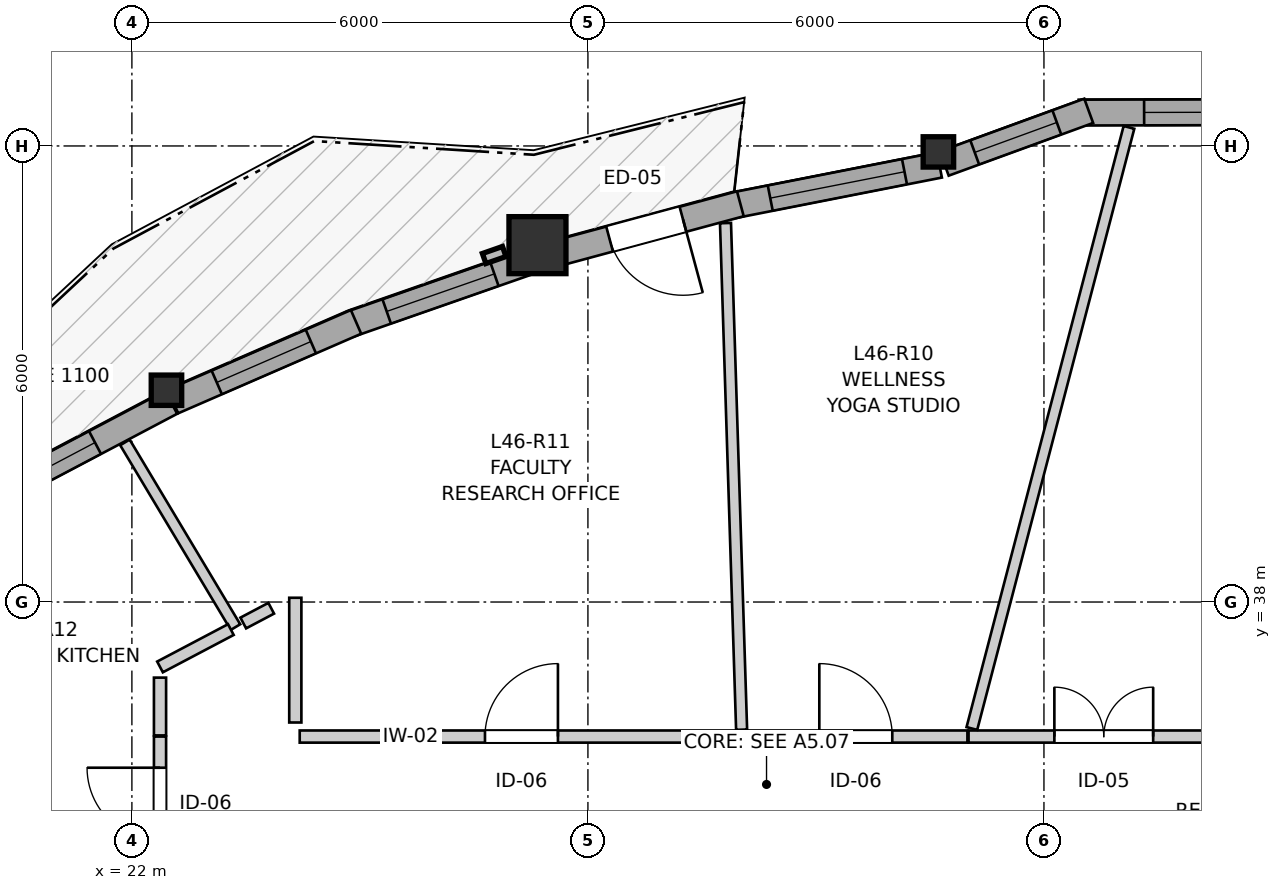
"""IFC4 building model, lengths in metres.
Left out: names, types, materials, properties, quantities, classifications, styles, units other than length and angle.
Written with IfcOpenShell. Run it as: python <this file> out.ifc"""

import sys

from ifc_helpers import new_model, si_unit, direction, frame, frame_2d, origin, origin_2d, place, context, subcontext, project, spatial, rectangle, i_section, extrude, source, transform, mapped, element, fill, save


model = new_model("IFC4")
c1 = context("Model", 3, precision=1e-05, world=origin(), true_north=direction((0.0, 1.0)))
c2 = subcontext(c1, "Body", "Model", "MODEL_VIEW")
j1 = project(units=[si_unit("LENGTHUNIT", "METRE"), si_unit("PLANEANGLEUNIT", "RADIAN")], contexts=[c1])
p1 = place(None, origin())
s1 = spatial("IfcSite", under=j1, at=p1, CompositionType="ELEMENT")
p2 = place(p1, origin())
s2 = spatial("IfcBuilding", under=s1, at=p2, CompositionType="ELEMENT")
p3 = place(p2, frame((0.0, 0.0, 155.4)))
s3 = spatial("IfcBuildingStorey", under=s2, at=p3, CompositionType="ELEMENT", Elevation=155.4)
m1 = source(origin(), c2, "Body", "SweptSolid", [
    extrude(i_section(OverallWidth=0.401, OverallDepth=0.399, WebThickness=0.023, FlangeThickness=0.036, FilletRadius=0.015, at=origin_2d()), origin(), (0.0, 0.0, 1.0), 2.935),
])
p4 = place(p3, frame((32.611, 43.922, 0.0), z_axis=(0.0, 0.0, 1.0), x_axis=(1.0, 0.0, 0.0)))
e1 = element("IfcColumn", 1, at=p4, inside=s3, PredefinedType="PILASTER", context=c2, shape_type="MappedRepresentation", body=[
    mapped(m1, transform((0.0, 0.0, 0.0), x_axis=(1.0, 0.0, 0.0), y_axis=(0.0, 1.0, 0.0), z_axis=(0.0, 0.0, 1.0), scale=1.0)),
])
m2 = source(origin(), c2, "Body", "SweptSolid", [
    extrude(rectangle(XDim=0.75, YDim=0.75, at=origin_2d()), origin(), (0.0, 0.0, 1.0), 2.935),
])
p5 = place(p3, frame((27.336, 42.695, 0.0), z_axis=(0.0, 0.0, 1.0), x_axis=(1.0, 0.0, 0.0)))
e2 = element("IfcColumn", 2, at=p5, inside=s3, PredefinedType="COLUMN", context=c2, shape_type="MappedRepresentation", body=[
    mapped(m2, transform((0.0, 0.0, 0.0), x_axis=(1.0, 0.0, 0.0), y_axis=(0.0, 1.0, 0.0), z_axis=(0.0, 0.0, 1.0), scale=1.0)),
])
p6 = place(p3, frame((22.455, 40.786, 0.0), z_axis=(0.0, 0.0, 1.0), x_axis=(1.0, 0.0, 0.0)))
e3 = element("IfcColumn", 3, at=p6, inside=s3, PredefinedType="PILASTER", context=c2, shape_type="MappedRepresentation", body=[
    mapped(m1, transform((0.0, 0.0, 0.0), x_axis=(1.0, 0.0, 0.0), y_axis=(0.0, 1.0, 0.0), z_axis=(0.0, 0.0, 1.0), scale=1.0)),
])
p7 = place(p3, frame((36.538, 44.444, 0.0), z_axis=(0.0, 0.0, 1.0), x_axis=(-0.999997247411, -0.002346309825, 0.0)))
e4 = element("IfcWall", 4, at=p7, inside=s3, PredefinedType="SOLIDWALL", context=c2, shape_type="SweptSolid", body=[
    extrude(rectangle(XDim=2.081, YDim=0.34, at=frame_2d((1.041, 0.0))), origin(), (0.0, 0.0, 1.0), 2.515),
])
p8 = place(p7, frame((0.271, 0.0, 0.82)))
e5 = element("IfcOpeningElement", 5, at=p8, cuts=e4, PredefinedType="OPENING", context=c2, shape_type="SweptSolid", body=[
    extrude(rectangle(XDim=0.95, YDim=1.35, at=frame_2d((0.475, 0.675))), frame((0.0, 0.18, 0.0), z_axis=(0.0, -1.0, 0.0), x_axis=(1.0, 0.0, 0.0)), (0.0, 0.0, 1.0), 0.36),
])
p9 = place(p3, frame((34.589, 44.462, 0.0), z_axis=(0.0, 0.0, 1.0), x_axis=(-0.939387553708, -0.342857148007, 0.0)))
e6 = element("IfcWall", 6, at=p9, inside=s3, PredefinedType="SOLIDWALL", context=c2, shape_type="SweptSolid", body=[
    extrude(rectangle(XDim=2.023, YDim=0.34, at=frame_2d((1.011, 0.0))), origin(), (0.0, 0.0, 1.0), 2.515),
])
p10 = place(p9, frame((0.447, 0.0, 0.82)))
e7 = element("IfcOpeningElement", 7, at=p10, cuts=e6, PredefinedType="OPENING", context=c2, shape_type="SweptSolid", body=[
    extrude(rectangle(XDim=1.15, YDim=1.2, at=frame_2d((0.575, 0.6))), frame((0.0, 0.18, 0.0), z_axis=(0.0, -1.0, 0.0), x_axis=(1.0, 0.0, 0.0)), (0.0, 0.0, 1.0), 0.36),
])
p11 = place(p3, frame((32.625, 43.751, 0.0), z_axis=(0.0, 0.0, 1.0), x_axis=(-0.981232663103, -0.192827541756, 0.0)))
e8 = element("IfcWall", 8, at=p11, inside=s3, PredefinedType="SOLIDWALL", context=c2, shape_type="SweptSolid", body=[
    extrude(rectangle(XDim=2.756, YDim=0.34, at=frame_2d((1.378, 0.0))), origin(), (0.0, 0.0, 1.0), 2.515),
])
p12 = place(p11, frame((0.468, 0.0, 0.82)))
e9 = element("IfcOpeningElement", 9, at=p12, cuts=e8, PredefinedType="OPENING", context=c2, shape_type="SweptSolid", body=[
    extrude(rectangle(XDim=1.8, YDim=1.45, at=frame_2d((0.9, 0.725))), frame((0.0, 0.18, 0.0), z_axis=(0.0, -1.0, 0.0), x_axis=(1.0, 0.0, 0.0)), (0.0, 0.0, 1.0), 0.36),
])
p13 = place(p3, frame((30.006, 43.24, 0.0), z_axis=(0.0, 0.0, 1.0), x_axis=(-0.965448248334, -0.260594857563, 0.0)))
e10 = element("IfcWall", 10, at=p13, inside=s3, PredefinedType="SOLIDWALL", context=c2, shape_type="SweptSolid", body=[
    extrude(rectangle(XDim=2.564, YDim=0.34, at=frame_2d((1.282, 0.0))), origin(), (0.0, 0.0, 1.0), 2.515),
])
p14 = place(p13, frame((0.782, 0.0, 0.0)))
e11 = element("IfcOpeningElement", 11, at=p14, cuts=e10, PredefinedType="OPENING", context=c2, shape_type="SweptSolid", body=[
    extrude(rectangle(XDim=1.0, YDim=2.1, at=frame_2d((0.5, 1.05))), frame((0.0, 0.18, 0.0), z_axis=(0.0, -1.0, 0.0), x_axis=(1.0, 0.0, 0.0)), (0.0, 0.0, 1.0), 0.36),
])
p15 = place(p3, frame((27.246, 42.483, 0.0), z_axis=(0.0, 0.0, 1.0), x_axis=(-0.944132901201, -0.32956496305, 0.0)))
e12 = element("IfcWall", 12, at=p15, inside=s3, PredefinedType="SOLIDWALL", context=c2, shape_type="SweptSolid", body=[
    extrude(rectangle(XDim=2.52, YDim=0.34, at=frame_2d((1.26, 0.0))), origin(), (0.0, 0.0, 1.0), 2.515),
])
p16 = place(p15, frame((0.505, 0.0, 0.82)))
e13 = element("IfcOpeningElement", 13, at=p16, cuts=e12, PredefinedType="OPENING", context=c2, shape_type="SweptSolid", body=[
    extrude(rectangle(XDim=1.5, YDim=1.45, at=frame_2d((0.75, 0.725))), frame((0.0, 0.18, 0.0), z_axis=(0.0, -1.0, 0.0), x_axis=(1.0, 0.0, 0.0)), (0.0, 0.0, 1.0), 0.36),
])
p17 = place(p3, frame((24.949, 41.685, 0.0), z_axis=(0.0, 0.0, 1.0), x_axis=(-0.917112921707, -0.398627506373, 0.0)))
e14 = element("IfcWall", 14, at=p17, inside=s3, PredefinedType="SOLIDWALL", context=c2, shape_type="SweptSolid", body=[
    extrude(rectangle(XDim=2.625, YDim=0.34, at=frame_2d((1.313, 0.0))), origin(), (0.0, 0.0, 1.0), 2.515),
])
p18 = place(p17, frame((0.648, 0.0, 0.82)))
e15 = element("IfcOpeningElement", 15, at=p18, cuts=e14, PredefinedType="OPENING", context=c2, shape_type="SweptSolid", body=[
    extrude(rectangle(XDim=1.35, YDim=1.45, at=frame_2d((0.675, 0.725))), frame((0.0, 0.18, 0.0), z_axis=(0.0, -1.0, 0.0), x_axis=(1.0, 0.0, 0.0)), (0.0, 0.0, 1.0), 0.36),
])
p19 = place(p3, frame((22.517, 40.627, 0.0), z_axis=(0.0, 0.0, 1.0), x_axis=(-0.884374030812, -0.466778934427, 0.0)))
e16 = element("IfcWall", 16, at=p19, inside=s3, PredefinedType="SOLIDWALL", context=c2, shape_type="SweptSolid", body=[
    extrude(rectangle(XDim=2.611, YDim=0.34, at=frame_2d((1.306, 0.0))), origin(), (0.0, 0.0, 1.0), 2.515),
])
p20 = place(p19, frame((1.133, 0.0, 0.82)))
e17 = element("IfcOpeningElement", 17, at=p20, cuts=e16, PredefinedType="OPENING", context=c2, shape_type="SweptSolid", body=[
    extrude(rectangle(XDim=1.05, YDim=1.45, at=frame_2d((0.525, 0.725))), frame((0.0, 0.18, 0.0), z_axis=(0.0, -1.0, 0.0), x_axis=(1.0, 0.0, 0.0)), (0.0, 0.0, 1.0), 0.36),
])
p21 = place(p3, frame((24.208, 36.23, 0.0), z_axis=(0.0, 0.0, 1.0), x_axis=(1.0, 0.0, 0.0)))
e18 = element("IfcWall", 18, at=p21, inside=s3, PredefinedType="PARTITIONING", context=c2, shape_type="SweptSolid", body=[
    extrude(rectangle(XDim=5.832, YDim=0.16, at=frame_2d((2.916, 0.0))), origin(), (0.0, 0.0, 1.0), 2.935),
])
p22 = place(p21, frame((2.438, 0.0, 0.0)))
e19 = element("IfcOpeningElement", 19, at=p22, cuts=e18, PredefinedType="OPENING", context=c2, shape_type="SweptSolid", body=[
    extrude(rectangle(XDim=0.96, YDim=2.1, at=frame_2d((0.48, 1.05))), frame((0.0, 0.09, 0.0), z_axis=(0.0, -1.0, 0.0), x_axis=(1.0, 0.0, 0.0)), (0.0, 0.0, 1.0), 0.18),
])
p23 = place(p3, frame((33.008, 36.23, 0.0), z_axis=(0.0, 0.0, 1.0), x_axis=(1.0, 0.0, 0.0)))
e20 = element("IfcWall", 20, at=p23, inside=s3, PredefinedType="PARTITIONING", context=c2, shape_type="SweptSolid", body=[
    extrude(rectangle(XDim=3.542, YDim=0.16, at=frame_2d((1.771, 0.0))), origin(), (0.0, 0.0, 1.0), 2.573),
])
p24 = place(p23, frame((1.129, 0.0, 0.0)))
e21 = element("IfcOpeningElement", 21, at=p24, cuts=e20, PredefinedType="OPENING", context=c2, shape_type="SweptSolid", body=[
    extrude(rectangle(XDim=1.3, YDim=2.1, at=frame_2d((0.65, 1.05))), frame((0.0, 0.09, 0.0), z_axis=(0.0, -1.0, 0.0), x_axis=(1.0, 0.0, 0.0)), (0.0, 0.0, 1.0), 0.18),
])
p25 = place(p3, frame((30.055, 36.23, 0.0), z_axis=(0.0, 0.0, 1.0), x_axis=(1.0, 0.0, 0.0)))
e22 = element("IfcWall", 22, at=p25, inside=s3, PredefinedType="PARTITIONING", context=c2, shape_type="SweptSolid", body=[
    extrude(rectangle(XDim=2.938, YDim=0.16, at=frame_2d((1.469, 0.0))), origin(), (0.0, 0.0, 1.0), 2.573),
])
p26 = place(p25, frame((0.99, 0.0, 0.0)))
e23 = element("IfcOpeningElement", 23, at=p26, cuts=e22, PredefinedType="OPENING", context=c2, shape_type="SweptSolid", body=[
    extrude(rectangle(XDim=0.96, YDim=2.1, at=frame_2d((0.48, 1.05))), frame((0.0, 0.09, 0.0), z_axis=(0.0, -1.0, 0.0), x_axis=(1.0, 0.0, 0.0)), (0.0, 0.0, 1.0), 0.18),
])
p27 = place(p3, frame((22.37, 34.45, 0.0), z_axis=(0.0, 0.0, 1.0), x_axis=(0.0, 1.0, 0.0)))
e24 = element("IfcWall", 24, at=p27, inside=s3, PredefinedType="PARTITIONING", context=c2, shape_type="SweptSolid", body=[
    extrude(rectangle(XDim=1.78, YDim=0.16, at=frame_2d((0.89, 0.0))), origin(), (0.0, 0.0, 1.0), 2.935),
])
p28 = place(p27, frame((0.41, 0.0, 0.0)))
e25 = element("IfcOpeningElement", 25, at=p28, cuts=e24, PredefinedType="OPENING", context=c2, shape_type="SweptSolid", body=[
    extrude(rectangle(XDim=0.96, YDim=2.1, at=frame_2d((0.48, 1.05))), frame((0.0, 0.09, 0.0), z_axis=(0.0, -1.0, 0.0), x_axis=(1.0, 0.0, 0.0)), (0.0, 0.0, 1.0), 0.18),
])
p29 = place(p3, frame((33.052, 36.336, 0.0), z_axis=(0.0, 0.0, 1.0), x_axis=(0.252838925964, 0.967508386277, 0.0)))
e26 = element("IfcWall", 26, at=p29, inside=s3, PredefinedType="PARTITIONING", context=c2, shape_type="SweptSolid", body=[
    extrude(rectangle(XDim=8.174, YDim=0.145, at=frame_2d((4.087, 0.0))), origin(), (0.0, 0.0, 1.0), 2.935),
])
p30 = place(p3, frame((29.81, 42.985, 0.0), z_axis=(0.0, 0.0, 1.0), x_axis=(0.031815387529, -0.99949376242, 0.0)))
e27 = element("IfcWall", 27, at=p30, inside=s3, PredefinedType="PARTITIONING", context=c2, shape_type="SweptSolid", body=[
    extrude(rectangle(XDim=6.668, YDim=0.145, at=frame_2d((3.334, 0.0))), origin(), (0.0, 0.0, 1.0), 2.935),
])
p31 = place(p3, frame((17.545, 37.432, 0.0), z_axis=(0.0, 0.0, 1.0), x_axis=(0.745965905636, -0.665984134668, 0.0)))
e28 = element("IfcWall", 28, at=p31, inside=s3, PredefinedType="PARTITIONING", context=c2, shape_type="SweptSolid", body=[
    extrude(rectangle(XDim=6.288, YDim=0.145, at=frame_2d((3.144, 0.0))), origin(), (0.0, 0.0, 1.0), 2.935),
])
p32 = place(p3, frame((21.908, 40.1, 0.0), z_axis=(0.0, 0.0, 1.0), x_axis=(0.513582752497, -0.85804006686, 0.0)))
e29 = element("IfcWall", 29, at=p32, inside=s3, PredefinedType="PARTITIONING", context=c2, shape_type="SweptSolid", body=[
    extrude(rectangle(XDim=2.832, YDim=0.145, at=frame_2d((1.416, 0.0))), origin(), (0.0, 0.0, 1.0), 2.935),
])
p33 = place(p3, frame((24.15, 36.415, 0.0), z_axis=(0.0, 0.0, 1.0), x_axis=(0.0, 1.0, 0.0)))
e30 = element("IfcWall", 30, at=p33, inside=s3, PredefinedType="PARTITIONING", context=c2, shape_type="SweptSolid", body=[
    extrude(rectangle(XDim=1.641, YDim=0.16, at=frame_2d((0.82, 0.0))), origin(), (0.0, 0.0, 1.0), 2.935),
])
p34 = place(p3, frame((22.37, 37.146, 0.0), z_axis=(0.0, 0.0, 1.0), x_axis=(0.884530854714, 0.46648168995, 0.0)))
e31 = element("IfcWall", 31, at=p34, inside=s3, PredefinedType="PARTITIONING", context=c2, shape_type="SweptSolid", body=[
    extrude(rectangle(XDim=1.053, YDim=0.16, at=frame_2d((0.527, 0.0))), origin(), (0.0, 0.0, 1.0), 2.543),
])
p35 = place(p3, frame((22.37, 36.245, 0.0), z_axis=(0.0, 0.0, 1.0), x_axis=(0.0, 1.0, 0.0)))
e32 = element("IfcWall", 32, at=p35, inside=s3, PredefinedType="PARTITIONING", context=c2, shape_type="SweptSolid", body=[
    extrude(rectangle(XDim=0.76, YDim=0.16, at=frame_2d((0.38, 0.0))), origin(), (0.0, 0.0, 1.0), 2.935),
])
p36 = place(p3, frame((23.465, 37.724, 0.0), z_axis=(0.0, 0.0, 1.0), x_axis=(0.884344349775, 0.466835164722, 0.0)))
e33 = element("IfcWall", 33, at=p36, inside=s3, PredefinedType="PARTITIONING", context=c2, shape_type="SweptSolid", body=[
    extrude(rectangle(XDim=0.416, YDim=0.16, at=frame_2d((0.208, 0.0))), origin(), (0.0, 0.0, 1.0), 2.543),
])
m3 = source(origin(), c2, "Body", "SweptSolid", [
    extrude(rectangle(XDim=0.95, YDim=1.35, at=frame_2d((0.475, 0.675))), frame((0.0, 0.03, 0.0), z_axis=(0.0, -1.0, 0.0), x_axis=(1.0, 0.0, 0.0)), (0.0, 0.0, 1.0), 0.06),
])
p37 = place(p8, origin())
e34 = element("IfcWindow", 34, at=p37, inside=s3, PartitioningType="SINGLE_PANEL", PredefinedType="WINDOW", context=c2, shape_type="MappedRepresentation", body=[
    mapped(m3, transform((0.0, 0.0, 0.0), x_axis=(1.0, 0.0, 0.0), y_axis=(0.0, 1.0, 0.0), z_axis=(0.0, 0.0, 1.0), scale=1.0)),
])
fill(e5, e34)
m4 = source(origin(), c2, "Body", "SweptSolid", [
    extrude(rectangle(XDim=1.15, YDim=1.2, at=frame_2d((0.575, 0.6))), frame((0.0, 0.03, 0.0), z_axis=(0.0, -1.0, 0.0), x_axis=(1.0, 0.0, 0.0)), (0.0, 0.0, 1.0), 0.06),
])
p38 = place(p10, origin())
e35 = element("IfcWindow", 35, at=p38, inside=s3, PartitioningType="SINGLE_PANEL", PredefinedType="WINDOW", context=c2, shape_type="MappedRepresentation", body=[
    mapped(m4, transform((0.0, 0.0, 0.0), x_axis=(1.0, 0.0, 0.0), y_axis=(0.0, 1.0, 0.0), z_axis=(0.0, 0.0, 1.0), scale=1.0)),
])
fill(e7, e35)
m5 = source(origin(), c2, "Body", "SweptSolid", [
    extrude(rectangle(XDim=1.8, YDim=1.45, at=frame_2d((0.9, 0.725))), frame((0.0, 0.03, 0.0), z_axis=(0.0, -1.0, 0.0), x_axis=(1.0, 0.0, 0.0)), (0.0, 0.0, 1.0), 0.06),
])
p39 = place(p12, origin())
e36 = element("IfcWindow", 36, at=p39, inside=s3, PartitioningType="SINGLE_PANEL", PredefinedType="WINDOW", context=c2, shape_type="MappedRepresentation", body=[
    mapped(m5, transform((0.0, 0.0, 0.0), x_axis=(1.0, 0.0, 0.0), y_axis=(0.0, 1.0, 0.0), z_axis=(0.0, 0.0, 1.0), scale=1.0)),
])
fill(e9, e36)
m6 = source(origin(), c2, "Body", "SweptSolid", [
    extrude(rectangle(XDim=1.5, YDim=1.45, at=frame_2d((0.75, 0.725))), frame((0.0, 0.03, 0.0), z_axis=(0.0, -1.0, 0.0), x_axis=(1.0, 0.0, 0.0)), (0.0, 0.0, 1.0), 0.06),
])
p40 = place(p16, origin())
e37 = element("IfcWindow", 37, at=p40, inside=s3, PartitioningType="SINGLE_PANEL", PredefinedType="WINDOW", context=c2, shape_type="MappedRepresentation", body=[
    mapped(m6, transform((0.0, 0.0, 0.0), x_axis=(1.0, 0.0, 0.0), y_axis=(0.0, 1.0, 0.0), z_axis=(0.0, 0.0, 1.0), scale=1.0)),
])
fill(e13, e37)
m7 = source(origin(), c2, "Body", "SweptSolid", [
    extrude(rectangle(XDim=1.35, YDim=1.45, at=frame_2d((0.675, 0.725))), frame((0.0, 0.03, 0.0), z_axis=(0.0, -1.0, 0.0), x_axis=(1.0, 0.0, 0.0)), (0.0, 0.0, 1.0), 0.06),
])
p41 = place(p18, origin())
e38 = element("IfcWindow", 38, at=p41, inside=s3, PartitioningType="SINGLE_PANEL", PredefinedType="WINDOW", context=c2, shape_type="MappedRepresentation", body=[
    mapped(m7, transform((0.0, 0.0, 0.0), x_axis=(1.0, 0.0, 0.0), y_axis=(0.0, 1.0, 0.0), z_axis=(0.0, 0.0, 1.0), scale=1.0)),
])
fill(e15, e38)
m8 = source(origin(), c2, "Body", "SweptSolid", [
    extrude(rectangle(XDim=1.05, YDim=1.45, at=frame_2d((0.525, 0.725))), frame((0.0, 0.03, 0.0), z_axis=(0.0, -1.0, 0.0), x_axis=(1.0, 0.0, 0.0)), (0.0, 0.0, 1.0), 0.06),
])
p42 = place(p20, origin())
e39 = element("IfcWindow", 39, at=p42, inside=s3, PartitioningType="SINGLE_PANEL", PredefinedType="WINDOW", context=c2, shape_type="MappedRepresentation", body=[
    mapped(m8, transform((0.0, 0.0, 0.0), x_axis=(1.0, 0.0, 0.0), y_axis=(0.0, 1.0, 0.0), z_axis=(0.0, 0.0, 1.0), scale=1.0)),
])
fill(e17, e39)
m9 = source(origin(), c2, "Body", "SweptSolid", [
    extrude(rectangle(XDim=1.0, YDim=2.1, at=frame_2d((0.5, 1.05))), frame((0.0, 0.025, 0.0), z_axis=(0.0, -1.0, 0.0), x_axis=(1.0, 0.0, 0.0)), (0.0, 0.0, 1.0), 0.05),
])
p43 = place(p14, origin())
e40 = element("IfcDoor", 40, at=p43, inside=s3, OperationType="SINGLE_SWING_LEFT", PredefinedType="DOOR", context=c2, shape_type="MappedRepresentation", body=[
    mapped(m9, transform((0.0, 0.0, 0.0), x_axis=(1.0, 0.0, 0.0), y_axis=(0.0, 1.0, 0.0), z_axis=(0.0, 0.0, 1.0), scale=1.0)),
])
fill(e11, e40)
m10 = source(origin(), c2, "Body", "SweptSolid", [
    extrude(rectangle(XDim=0.96, YDim=2.1, at=frame_2d((0.48, 1.05))), frame((0.0, 0.025, 0.0), z_axis=(0.0, -1.0, 0.0), x_axis=(1.0, 0.0, 0.0)), (0.0, 0.0, 1.0), 0.05),
])
p44 = place(p22, origin())
e41 = element("IfcDoor", 41, at=p44, inside=s3, OperationType="SINGLE_SWING_RIGHT", PredefinedType="DOOR", context=c2, shape_type="MappedRepresentation", body=[
    mapped(m10, transform((0.0, 0.0, 0.0), x_axis=(1.0, 0.0, 0.0), y_axis=(0.0, 1.0, 0.0), z_axis=(0.0, 0.0, 1.0), scale=1.0)),
])
fill(e19, e41)
m11 = source(origin(), c2, "Body", "SweptSolid", [
    extrude(rectangle(XDim=1.3, YDim=2.1, at=frame_2d((0.65, 1.05))), frame((0.0, 0.025, 0.0), z_axis=(0.0, -1.0, 0.0), x_axis=(1.0, 0.0, 0.0)), (0.0, 0.0, 1.0), 0.05),
])
p45 = place(p24, origin())
e42 = element("IfcDoor", 42, at=p45, inside=s3, OperationType="DOUBLE_DOOR_SINGLE_SWING", PredefinedType="DOOR", context=c2, shape_type="MappedRepresentation", body=[
    mapped(m11, transform((0.0, 0.0, 0.0), x_axis=(1.0, 0.0, 0.0), y_axis=(0.0, 1.0, 0.0), z_axis=(0.0, 0.0, 1.0), scale=1.0)),
])
fill(e21, e42)
p46 = place(p26, origin())
e43 = element("IfcDoor", 43, at=p46, inside=s3, OperationType="SINGLE_SWING_LEFT", PredefinedType="DOOR", context=c2, shape_type="MappedRepresentation", body=[
    mapped(m10, transform((0.0, 0.0, 0.0), x_axis=(1.0, 0.0, 0.0), y_axis=(0.0, 1.0, 0.0), z_axis=(0.0, 0.0, 1.0), scale=1.0)),
])
fill(e23, e43)
p47 = place(p28, origin())
e44 = element("IfcDoor", 44, at=p47, inside=s3, OperationType="SINGLE_SWING_RIGHT", PredefinedType="DOOR", context=c2, shape_type="MappedRepresentation", body=[
    mapped(m10, transform((0.0, 0.0, 0.0), x_axis=(1.0, 0.0, 0.0), y_axis=(0.0, 1.0, 0.0), z_axis=(0.0, 0.0, 1.0), scale=1.0)),
])
fill(e25, e44)
save(model, sys.argv[1])
